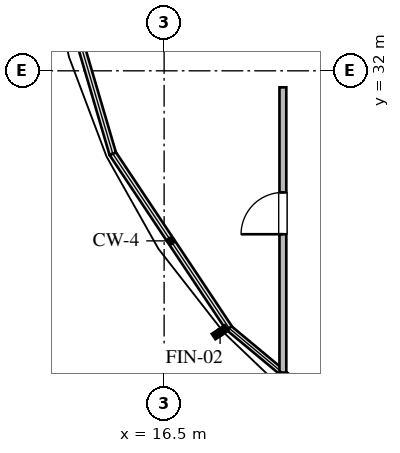
"""IFC4 building model, lengths in metres.
Left out: names, types, materials, properties, quantities, classifications, styles, units other than length and angle.
Written with IfcOpenShell. Run it as: python <this file> out.ifc"""

import sys

from ifc_helpers import new_model, si_unit, direction, frame, frame_2d, origin, place, context, subcontext, project, spatial, rectangle, extrude, element, fill, save


model = new_model("IFC4")
c1 = context("Model", 3, precision=1e-05, world=origin(), true_north=direction((0.0, 1.0)))
c2 = subcontext(c1, "Body", "Model", "MODEL_VIEW")
j1 = project(units=[si_unit("LENGTHUNIT", "METRE"), si_unit("PLANEANGLEUNIT", "RADIAN")], contexts=[c1])
p1 = place(None, origin())
s1 = spatial("IfcSite", under=j1, at=p1, CompositionType="ELEMENT")
p2 = place(p1, origin())
s2 = spatial("IfcBuilding", under=s1, at=p2, CompositionType="ELEMENT")
p3 = place(p2, frame((0.0, 0.0, 217.2)))
s3 = spatial("IfcBuildingStorey", under=s2, at=p3, CompositionType="ELEMENT", Elevation=217.2)
p4 = place(p3, frame((19.625, 24.06, 0.0), z_axis=(0.0, 0.0, 1.0), x_axis=(0.0, 1.0, 0.0)))
e1 = element("IfcWall", 1, at=p4, inside=s3, PredefinedType="PARTITIONING", context=c2, shape_type="SweptSolid", body=[
    extrude(rectangle(XDim=7.505, YDim=0.18, at=frame_2d((3.752, 0.0))), origin(), (0.0, 0.0, 1.0), 2.817),
])
p5 = place(p4, frame((3.64, 0.0, 0.0)))
e2 = element("IfcOpeningElement", 2, at=p5, cuts=e1, PredefinedType="OPENING", context=c2, shape_type="SweptSolid", body=[
    extrude(rectangle(XDim=1.1, YDim=2.1, at=frame_2d((0.55, 1.05))), frame((0.0, 0.1, 0.0), z_axis=(0.0, -1.0, 0.0), x_axis=(1.0, 0.0, 0.0)), (0.0, 0.0, 1.0), 0.2),
])
p6 = place(p5, origin())
e3 = element("IfcDoor", 3, at=p6, inside=s3, OperationType="SINGLE_SWING_LEFT", PredefinedType="DOOR", context=c2, shape_type="SweptSolid", body=[
    extrude(rectangle(XDim=1.1, YDim=2.1, at=frame_2d((0.55, 1.05))), frame((0.0, 0.025, 0.0), z_axis=(0.0, -1.0, 0.0), x_axis=(1.0, 0.0, 0.0)), (0.0, 0.0, 1.0), 0.05),
])
fill(e2, e3)
save(model, sys.argv[1])
